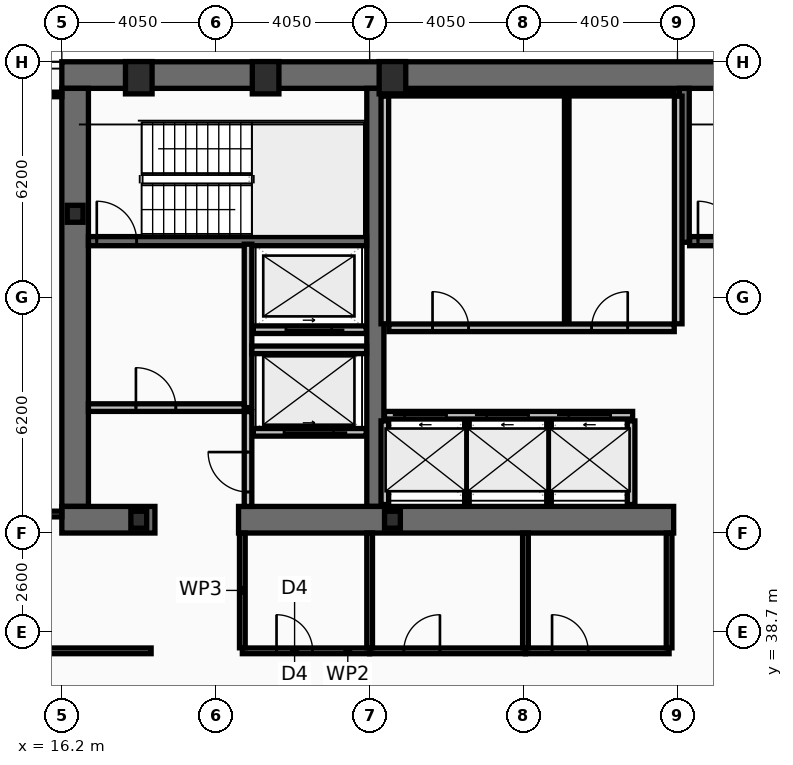
"""IFC4 building model, lengths in metres.
Left out: names, types, materials, properties, quantities, classifications, styles, units other than length and angle.
Written with IfcOpenShell. Run it as: python <this file> out.ifc"""

import sys

from ifc_helpers import new_model, si_unit, direction, frame, frame_2d, origin, origin_2d, place, context, subcontext, project, spatial, rectangle, hollow_rectangle, i_section, extrude, element, fill, save


model = new_model("IFC4")
c1 = context("Model", 3, precision=1e-05, world=origin(), true_north=direction((0.0, 1.0)))
c2 = subcontext(c1, "Body", "Model", "MODEL_VIEW")
j1 = project(units=[si_unit("LENGTHUNIT", "METRE"), si_unit("PLANEANGLEUNIT", "RADIAN")], contexts=[c1])
p1 = place(None, origin())
s1 = spatial("IfcSite", under=j1, at=p1, CompositionType="ELEMENT")
p2 = place(p1, origin())
s2 = spatial("IfcBuilding", under=s1, at=p2, CompositionType="ELEMENT")
p3 = place(p2, frame((0.0, 0.0, 129.0)))
s3 = spatial("IfcBuildingStorey", under=s2, at=p3, CompositionType="ELEMENT", Elevation=129.0)
p4 = place(p3, frame((16.2, 53.35, 0.0), z_axis=(0.0, 0.0, 1.0), x_axis=(1.0, 0.0, 0.0)))
e1 = element("IfcWall", 1, at=p4, inside=s3, PredefinedType="SHEAR", context=c2, shape_type="SweptSolid", body=[
    extrude(rectangle(XDim=40.5, YDim=0.7, at=frame_2d((20.25, 0.0))), origin(), (0.0, 0.0, 1.0), 3.44),
])
p5 = place(p3, frame((16.55, 42.0, 0.0), z_axis=(0.0, 0.0, 1.0), x_axis=(0.0, 1.0, 0.0)))
e2 = element("IfcWall", 2, at=p5, inside=s3, PredefinedType="SHEAR", context=c2, shape_type="SweptSolid", body=[
    extrude(rectangle(XDim=11.0, YDim=0.7, at=frame_2d((5.5, 0.0))), origin(), (0.0, 0.0, 1.0), 3.44),
])
p6 = place(p3, frame((24.45, 42.0, 0.0), z_axis=(0.0, 0.0, 1.0), x_axis=(0.0, 1.0, 0.0)))
e3 = element("IfcWall", 3, at=p6, inside=s3, PredefinedType="SHEAR", context=c2, shape_type="SweptSolid", body=[
    extrude(rectangle(XDim=11.0, YDim=0.45, at=frame_2d((5.5, 0.0))), origin(), (0.0, 0.0, 1.0), 3.44),
])
p7 = place(p3, frame((18.65, 41.65, 0.0), z_axis=(0.0, 0.0, 1.0), x_axis=(-1.0, 0.0, 0.0)))
e4 = element("IfcWall", 4, at=p7, inside=s3, PredefinedType="SHEAR", context=c2, shape_type="SweptSolid", body=[
    extrude(rectangle(XDim=2.45, YDim=0.7, at=frame_2d((1.225, 0.0))), origin(), (0.0, 0.0, 1.0), 3.44),
])
p8 = place(p3, frame((32.3, 41.65, 0.0), z_axis=(0.0, 0.0, 1.0), x_axis=(-1.0, 0.0, 0.0)))
e5 = element("IfcWall", 5, at=p8, inside=s3, PredefinedType="SHEAR", context=c2, shape_type="SweptSolid", body=[
    extrude(rectangle(XDim=11.45, YDim=0.7, at=frame_2d((5.725, 0.0))), origin(), (0.0, 0.0, 1.0), 3.44),
])
p9 = place(p3, frame((32.58, 48.95, 0.0), z_axis=(0.0, 0.0, 1.0), x_axis=(0.0, 1.0, 0.0)))
e6 = element("IfcWall", 6, at=p9, inside=s3, PredefinedType="SHEAR", context=c2, shape_type="SweptSolid", body=[
    extrude(rectangle(XDim=4.05, YDim=0.26, at=frame_2d((2.025, 0.0))), origin(), (0.0, 0.0, 1.0), 3.44),
])
p10 = place(p3, frame((16.9, 48.98, 0.0), z_axis=(0.0, 0.0, 1.0), x_axis=(1.0, 0.0, 0.0)))
e7 = element("IfcWall", 7, at=p10, inside=s3, PredefinedType="SHEAR", context=c2, shape_type="SweptSolid", body=[
    extrude(rectangle(XDim=7.32, YDim=0.24, at=frame_2d((3.66, 0.0))), origin(), (0.0, 0.0, 1.0), 3.44),
])
p11 = place(p10, frame((0.22, 0.0, 0.0)))
e8 = element("IfcOpeningElement", 8, at=p11, cuts=e7, PredefinedType="OPENING", context=c2, shape_type="SweptSolid", body=[
    extrude(rectangle(XDim=1.05, YDim=2.15, at=frame_2d((0.525, 1.075))), frame((0.0, 0.13, 0.0), z_axis=(0.0, -1.0, 0.0), x_axis=(1.0, 0.0, 0.0)), (0.0, 0.0, 1.0), 0.26),
])
p12 = place(p3, frame((32.72, 48.98, 0.0), z_axis=(0.0, 0.0, 1.0), x_axis=(1.0, 0.0, 0.0)))
e9 = element("IfcWall", 9, at=p12, inside=s3, PredefinedType="SHEAR", context=c2, shape_type="SweptSolid", body=[
    extrude(rectangle(XDim=7.56, YDim=0.24, at=frame_2d((3.78, 0.0))), origin(), (0.0, 0.0, 1.0), 3.44),
])
p13 = place(p12, frame((0.22, 0.0, 0.0)))
e10 = element("IfcOpeningElement", 10, at=p13, cuts=e9, PredefinedType="OPENING", context=c2, shape_type="SweptSolid", body=[
    extrude(rectangle(XDim=1.05, YDim=2.15, at=frame_2d((0.525, 1.075))), frame((0.0, 0.13, 0.0), z_axis=(0.0, -1.0, 0.0), x_axis=(1.0, 0.0, 0.0)), (0.0, 0.0, 1.0), 0.26),
])
for number, where, z_axis, x_axis in (
    (11, (18.225, 53.28, 0.0), (0.0, 0.0, 1.0), (1.0, 0.0, 0.0)),
    (12, (21.562, 53.28, 0.0), (0.0, 0.0, 1.0), (1.0, 0.0, 0.0)),
    (13, (24.9, 53.28, 0.0), (0.0, 0.0, 1.0), (1.0, 0.0, 0.0)),
):
    element("IfcColumn", number, at=place(p3, frame(where, z_axis=z_axis, x_axis=x_axis)), inside=s3, PredefinedType="COLUMN", context=c2, shape_type="SweptSolid", body=[
        extrude(hollow_rectangle(XDim=0.7, YDim=0.85, WallThickness=0.05, at=origin_2d()), origin(), (0.0, 0.0, 1.0), 3.6),
    ])
for number, where, z_axis, x_axis in (
    (14, (16.55, 49.7, 0.0), (0.0, 0.0, 1.0), (1.0, 0.0, 0.0)),
    (15, (18.225, 41.65, 0.0), (0.0, 0.0, 1.0), (1.0, 0.0, 0.0)),
    (16, (24.9, 41.65, 0.0), (0.0, 0.0, 1.0), (1.0, 0.0, 0.0)),
):
    element("IfcColumn", number, at=place(p3, frame(where, z_axis=z_axis, x_axis=x_axis)), inside=s3, PredefinedType="COLUMN", context=c2, shape_type="SweptSolid", body=[
        extrude(i_section(OverallWidth=0.416, OverallDepth=0.446, WebThickness=0.039, FlangeThickness=0.063, at=origin_2d()), origin(), (0.0, 0.0, 1.0), 3.6),
    ])
p14 = place(p3, frame((24.69, 44.4, 0.0), z_axis=(0.0, 0.0, 1.0), x_axis=(1.0, 0.0, 0.0)))
e17 = element("IfcWall", 17, at=p14, inside=s3, PredefinedType="PARTITIONING", context=c2, shape_type="SweptSolid", body=[
    extrude(rectangle(XDim=6.53, YDim=0.2, at=frame_2d((3.265, 0.0))), origin(), (0.0, 0.0, 1.0), 3.44),
])
p15 = place(p14, frame((0.53, 0.0, 0.0)))
e18 = element("IfcOpeningElement", 18, at=p15, cuts=e17, PredefinedType="OPENING", context=c2, shape_type="SweptSolid", body=[
    extrude(rectangle(XDim=1.1, YDim=2.18, at=frame_2d((0.55, 1.09))), frame((0.0, 0.11, 0.0), z_axis=(0.0, -1.0, 0.0), x_axis=(1.0, 0.0, 0.0)), (0.0, 0.0, 1.0), 0.22),
])
p16 = place(p14, frame((2.69, 0.0, 0.0)))
e19 = element("IfcOpeningElement", 19, at=p16, cuts=e17, PredefinedType="OPENING", context=c2, shape_type="SweptSolid", body=[
    extrude(rectangle(XDim=1.1, YDim=2.18, at=frame_2d((0.55, 1.09))), frame((0.0, 0.11, 0.0), z_axis=(0.0, -1.0, 0.0), x_axis=(1.0, 0.0, 0.0)), (0.0, 0.0, 1.0), 0.22),
])
p17 = place(p14, frame((4.85, 0.0, 0.0)))
e20 = element("IfcOpeningElement", 20, at=p17, cuts=e17, PredefinedType="OPENING", context=c2, shape_type="SweptSolid", body=[
    extrude(rectangle(XDim=1.1, YDim=2.18, at=frame_2d((0.55, 1.09))), frame((0.0, 0.11, 0.0), z_axis=(0.0, -1.0, 0.0), x_axis=(1.0, 0.0, 0.0)), (0.0, 0.0, 1.0), 0.22),
])
p18 = place(p3, frame((24.21, 43.95, 0.0), z_axis=(0.0, 0.0, 1.0), x_axis=(-1.0, 0.0, 0.0)))
e21 = element("IfcWall", 21, at=p18, inside=s3, PredefinedType="PARTITIONING", context=c2, shape_type="SweptSolid", body=[
    extrude(rectangle(XDim=2.97, YDim=0.2, at=frame_2d((1.485, 0.0))), origin(), (0.0, 0.0, 1.0), 3.44),
])
p19 = place(p18, frame((0.86, 0.0, 0.0)))
e22 = element("IfcOpeningElement", 22, at=p19, cuts=e21, PredefinedType="OPENING", context=c2, shape_type="SweptSolid", body=[
    extrude(rectangle(XDim=1.3, YDim=2.18, at=frame_2d((0.65, 1.09))), frame((0.0, 0.11, 0.0), z_axis=(0.0, -1.0, 0.0), x_axis=(1.0, 0.0, 0.0)), (0.0, 0.0, 1.0), 0.22),
])
p20 = place(p3, frame((24.21, 46.65, 0.0), z_axis=(0.0, 0.0, 1.0), x_axis=(-1.0, 0.0, 0.0)))
e23 = element("IfcWall", 23, at=p20, inside=s3, PredefinedType="PARTITIONING", context=c2, shape_type="SweptSolid", body=[
    extrude(rectangle(XDim=2.97, YDim=0.2, at=frame_2d((1.485, 0.0))), origin(), (0.0, 0.0, 1.0), 3.44),
])
p21 = place(p20, frame((0.91, 0.0, 0.0)))
e24 = element("IfcOpeningElement", 24, at=p21, cuts=e23, PredefinedType="OPENING", context=c2, shape_type="SweptSolid", body=[
    extrude(rectangle(XDim=1.2, YDim=2.18, at=frame_2d((0.6, 1.09))), frame((0.0, 0.11, 0.0), z_axis=(0.0, -1.0, 0.0), x_axis=(1.0, 0.0, 0.0)), (0.0, 0.0, 1.0), 0.22),
])
p22 = place(p3, frame((21.1, 44.6, 0.0), z_axis=(0.0, 0.0, 1.0), x_axis=(0.0, 1.0, 0.0)))
e25 = element("IfcWall", 25, at=p22, inside=s3, PredefinedType="PARTITIONING", context=c2, shape_type="SweptSolid", body=[
    extrude(rectangle(XDim=4.3, YDim=0.2, at=frame_2d((2.15, 0.0))), origin(), (0.0, 0.0, 1.0), 3.44),
])
p23 = place(p3, frame((16.9, 44.6, 0.0), z_axis=(0.0, 0.0, 1.0), x_axis=(1.0, 0.0, 0.0)))
e26 = element("IfcWall", 26, at=p23, inside=s3, PredefinedType="PARTITIONING", context=c2, shape_type="SweptSolid", body=[
    extrude(rectangle(XDim=4.1, YDim=0.2, at=frame_2d((2.05, 0.0))), origin(), (0.0, 0.0, 1.0), 3.44),
])
p24 = place(p23, frame((1.25, 0.0, 0.0)))
e27 = element("IfcOpeningElement", 27, at=p24, cuts=e26, PredefinedType="OPENING", context=c2, shape_type="SweptSolid", body=[
    extrude(rectangle(XDim=1.05, YDim=2.15, at=frame_2d((0.525, 1.075))), frame((0.0, 0.11, 0.0), z_axis=(0.0, -1.0, 0.0), x_axis=(1.0, 0.0, 0.0)), (0.0, 0.0, 1.0), 0.22),
])
p25 = place(p3, frame((21.2, 46.12, 0.0), z_axis=(0.0, 0.0, 1.0), x_axis=(1.0, 0.0, 0.0)))
e28 = element("IfcWall", 28, at=p25, inside=s3, PredefinedType="PARTITIONING", context=c2, shape_type="SweptSolid", body=[
    extrude(rectangle(XDim=3.02, YDim=0.2, at=frame_2d((1.51, 0.0))), origin(), (0.0, 0.0, 1.0), 3.44),
])
p26 = place(p3, frame((21.1, 42.0, 0.0), z_axis=(0.0, 0.0, 1.0), x_axis=(0.0, 1.0, 0.0)))
e29 = element("IfcWall", 29, at=p26, inside=s3, PredefinedType="PARTITIONING", context=c2, shape_type="SweptSolid", body=[
    extrude(rectangle(XDim=2.495, YDim=0.2, at=frame_2d((1.248, 0.0))), origin(), (0.0, 0.0, 1.0), 3.44),
])
p27 = place(p26, frame((0.38, 0.0, 0.0)))
e30 = element("IfcOpeningElement", 30, at=p27, cuts=e29, PredefinedType="OPENING", context=c2, shape_type="SweptSolid", body=[
    extrude(rectangle(XDim=1.05, YDim=2.15, at=frame_2d((0.525, 1.075))), frame((0.0, 0.11, 0.0), z_axis=(0.0, -1.0, 0.0), x_axis=(1.0, 0.0, 0.0)), (0.0, 0.0, 1.0), 0.22),
])
for number, where, z_axis, x_axis in (
    (31, (24.7, 46.805, 0.0), (0.0, 0.0, 1.0), (0.0, 1.0, 0.0)),
    (32, (32.42, 46.805, 0.0), (0.0, 0.0, 1.0), (0.0, 1.0, 0.0)),
):
    element("IfcWall", number, at=place(p3, frame(where, z_axis=z_axis, x_axis=x_axis)), inside=s3, PredefinedType="PARTITIONING", context=c2, shape_type="SweptSolid", body=[
        extrude(rectangle(XDim=5.99, YDim=0.2, at=frame_2d((2.995, 0.0))), origin(), (0.0, 0.0, 1.0), 3.44),
    ])
p28 = place(p3, frame((24.805, 52.86, 0.0), z_axis=(0.0, 0.0, 1.0), x_axis=(1.0, 0.0, 0.0)))
e33 = element("IfcWall", 33, at=p28, inside=s3, PredefinedType="PARTITIONING", context=c2, shape_type="SweptSolid", body=[
    extrude(rectangle(XDim=7.51, YDim=0.12, at=frame_2d((3.755, 0.0))), origin(), (0.0, 0.0, 1.0), 3.44),
])
p29 = place(p3, frame((29.486, 46.805, 0.0), z_axis=(0.0, 0.0, 1.0), x_axis=(0.0, 1.0, 0.0)))
e34 = element("IfcWall", 34, at=p29, inside=s3, PredefinedType="PARTITIONING", context=c2, shape_type="SweptSolid", body=[
    extrude(rectangle(XDim=5.99, YDim=0.12, at=frame_2d((2.995, 0.0))), origin(), (0.0, 0.0, 1.0), 3.44),
])
p30 = place(p3, frame((24.805, 46.7, 0.0), z_axis=(0.0, 0.0, 1.0), x_axis=(1.0, 0.0, 0.0)))
e35 = element("IfcWall", 35, at=p30, inside=s3, PredefinedType="PARTITIONING", context=c2, shape_type="SweptSolid", body=[
    extrude(rectangle(XDim=7.51, YDim=0.2, at=frame_2d((3.755, 0.0))), origin(), (0.0, 0.0, 1.0), 3.44),
])
p31 = place(p30, frame((1.15, 0.0, 0.0)))
e36 = element("IfcOpeningElement", 36, at=p31, cuts=e35, PredefinedType="OPENING", context=c2, shape_type="SweptSolid", body=[
    extrude(rectangle(XDim=0.95, YDim=2.1, at=frame_2d((0.475, 1.05))), frame((0.0, 0.11, 0.0), z_axis=(0.0, -1.0, 0.0), x_axis=(1.0, 0.0, 0.0)), (0.0, 0.0, 1.0), 0.22),
])
p32 = place(p30, frame((5.336, 0.0, 0.0)))
e37 = element("IfcOpeningElement", 37, at=p32, cuts=e35, PredefinedType="OPENING", context=c2, shape_type="SweptSolid", body=[
    extrude(rectangle(XDim=0.95, YDim=2.1, at=frame_2d((0.475, 1.05))), frame((0.0, 0.11, 0.0), z_axis=(0.0, -1.0, 0.0), x_axis=(1.0, 0.0, 0.0)), (0.0, 0.0, 1.0), 0.22),
])
for number, where, z_axis, x_axis in (
    (38, (24.7, 42.05, 0.0), (0.0, 0.0, 1.0), (0.0, 1.0, 0.0)),
    (39, (31.18, 42.05, 0.0), (0.0, 0.0, 1.0), (0.0, 1.0, 0.0)),
):
    element("IfcWall", number, at=place(p3, frame(where, z_axis=z_axis, x_axis=x_axis)), inside=s3, PredefinedType="PARTITIONING", context=c2, shape_type="SweptSolid", body=[
        extrude(rectangle(XDim=2.2, YDim=0.2, at=frame_2d((1.1, 0.0))), origin(), (0.0, 0.0, 1.0), 3.44),
    ])
for number, where, z_axis, x_axis in (
    (40, (26.86, 42.05, 0.0), (0.0, 0.0, 1.0), (0.0, 1.0, 0.0)),
    (41, (29.02, 42.05, 0.0), (0.0, 0.0, 1.0), (0.0, 1.0, 0.0)),
):
    element("IfcWall", number, at=place(p3, frame(where, z_axis=z_axis, x_axis=x_axis)), inside=s3, PredefinedType="PARTITIONING", context=c2, shape_type="SweptSolid", body=[
        extrude(rectangle(XDim=2.2, YDim=0.12, at=frame_2d((1.1, 0.0))), origin(), (0.0, 0.0, 1.0), 3.44),
    ])
p33 = place(p3, frame((20.95, 38.2, 0.0), z_axis=(0.0, 0.0, 1.0), x_axis=(1.0, 0.0, 0.0)))
e42 = element("IfcWall", 42, at=p33, inside=s3, PredefinedType="PARTITIONING", context=c2, shape_type="SweptSolid", body=[
    extrude(rectangle(XDim=3.35, YDim=0.15, at=frame_2d((1.675, 0.0))), origin(), (0.0, 0.0, 1.0), 3.44),
])
p34 = place(p33, frame((0.9, 0.0, 0.0)))
e43 = element("IfcOpeningElement", 43, at=p34, cuts=e42, PredefinedType="OPENING", context=c2, shape_type="SweptSolid", body=[
    extrude(rectangle(XDim=0.95, YDim=2.05, at=frame_2d((0.475, 1.025))), frame((0.0, 0.085, 0.0), z_axis=(0.0, -1.0, 0.0), x_axis=(1.0, 0.0, 0.0)), (0.0, 0.0, 1.0), 0.17),
])
p35 = place(p3, frame((24.3, 38.2, 0.0), z_axis=(0.0, 0.0, 1.0), x_axis=(1.0, 0.0, 0.0)))
e44 = element("IfcWall", 44, at=p35, inside=s3, PredefinedType="PARTITIONING", context=c2, shape_type="SweptSolid", body=[
    extrude(rectangle(XDim=4.1, YDim=0.15, at=frame_2d((2.05, 0.0))), origin(), (0.0, 0.0, 1.0), 2.73),
])
p36 = place(p35, frame((0.9, 0.0, 0.0)))
e45 = element("IfcOpeningElement", 45, at=p36, cuts=e44, PredefinedType="OPENING", context=c2, shape_type="SweptSolid", body=[
    extrude(rectangle(XDim=0.95, YDim=2.05, at=frame_2d((0.475, 1.025))), frame((0.0, 0.085, 0.0), z_axis=(0.0, -1.0, 0.0), x_axis=(1.0, 0.0, 0.0)), (0.0, 0.0, 1.0), 0.17),
])
p37 = place(p3, frame((28.4, 38.2, 0.0), z_axis=(0.0, 0.0, 1.0), x_axis=(1.0, 0.0, 0.0)))
e46 = element("IfcWall", 46, at=p37, inside=s3, PredefinedType="PARTITIONING", context=c2, shape_type="SweptSolid", body=[
    extrude(rectangle(XDim=3.78, YDim=0.15, at=frame_2d((1.89, 0.0))), origin(), (0.0, 0.0, 1.0), 2.73),
])
p38 = place(p37, frame((0.7, 0.0, 0.0)))
e47 = element("IfcOpeningElement", 47, at=p38, cuts=e46, PredefinedType="OPENING", context=c2, shape_type="SweptSolid", body=[
    extrude(rectangle(XDim=0.95, YDim=2.05, at=frame_2d((0.475, 1.025))), frame((0.0, 0.085, 0.0), z_axis=(0.0, -1.0, 0.0), x_axis=(1.0, 0.0, 0.0)), (0.0, 0.0, 1.0), 0.17),
])
for number, where, z_axis, x_axis in (
    (48, (20.95, 38.28, 0.0), (0.0, 0.0, 1.0), (0.0, 1.0, 0.0)),
    (49, (24.3, 38.28, 0.0), (0.0, 0.0, 1.0), (0.0, 1.0, 0.0)),
    (50, (28.4, 38.28, 0.0), (0.0, 0.0, 1.0), (0.0, 1.0, 0.0)),
    (51, (32.18, 38.28, 0.0), (0.0, 0.0, 1.0), (0.0, 1.0, 0.0)),
):
    element("IfcWall", number, at=place(p3, frame(where, z_axis=z_axis, x_axis=x_axis)), inside=s3, PredefinedType="PARTITIONING", context=c2, shape_type="SweptSolid", body=[
        extrude(rectangle(XDim=3.02, YDim=0.15, at=frame_2d((1.51, 0.0))), origin(), (0.0, 0.0, 1.0), 3.44),
    ])
p39 = place(p3, frame((4.03, 38.2, 0.0), z_axis=(0.0, 0.0, 1.0), x_axis=(1.0, 0.0, 0.0)))
e52 = element("IfcWall", 52, at=p39, inside=s3, PredefinedType="PARTITIONING", context=c2, shape_type="SweptSolid", body=[
    extrude(rectangle(XDim=14.52, YDim=0.15, at=frame_2d((7.26, 0.0))), origin(), (0.0, 0.0, 1.0), 2.73),
])
p40 = place(p39, frame((10.32, 0.0, 0.0)))
e53 = element("IfcOpeningElement", 53, at=p40, cuts=e52, PredefinedType="OPENING", context=c2, shape_type="SweptSolid", body=[
    extrude(rectangle(XDim=0.95, YDim=2.05, at=frame_2d((0.475, 1.025))), frame((0.0, 0.085, 0.0), z_axis=(0.0, -1.0, 0.0), x_axis=(1.0, 0.0, 0.0)), (0.0, 0.0, 1.0), 0.17),
])
p41 = place(p3, frame((4.095, 41.8, 0.0), z_axis=(0.0, 0.0, 1.0), x_axis=(1.0, 0.0, 0.0)))
e54 = element("IfcWall", 54, at=p41, inside=s3, PredefinedType="PARTITIONING", context=c2, shape_type="SweptSolid", body=[
    extrude(rectangle(XDim=12.105, YDim=0.15, at=frame_2d((6.052, 0.0))), origin(), (0.0, 0.0, 1.0), 3.44),
])
p42 = place(p41, frame((10.32, 0.0, 0.0)))
e55 = element("IfcOpeningElement", 55, at=p42, cuts=e54, PredefinedType="OPENING", context=c2, shape_type="SweptSolid", body=[
    extrude(rectangle(XDim=0.9, YDim=2.05, at=frame_2d((0.45, 1.025))), frame((0.0, 0.085, 0.0), z_axis=(0.0, -1.0, 0.0), x_axis=(1.0, 0.0, 0.0)), (0.0, 0.0, 1.0), 0.17),
])
p43 = place(p3, frame((4.095, 52.84, 0.0), z_axis=(0.0, 0.0, 1.0), x_axis=(1.0, 0.0, 0.0)))
e56 = element("IfcWall", 56, at=p43, inside=s3, PredefinedType="PARTITIONING", context=c2, shape_type="SweptSolid", body=[
    extrude(rectangle(XDim=12.105, YDim=0.12, at=frame_2d((6.052, 0.0))), origin(), (0.0, 0.0, 1.0), 3.44),
])
p44 = place(p11, origin())
e57 = element("IfcDoor", 57, at=p44, inside=s3, OperationType="SINGLE_SWING_LEFT", PredefinedType="DOOR", context=c2, shape_type="SweptSolid", body=[
    extrude(rectangle(XDim=1.05, YDim=2.15, at=frame_2d((0.525, 1.075))), frame((0.0, 0.025, 0.0), z_axis=(0.0, -1.0, 0.0), x_axis=(1.0, 0.0, 0.0)), (0.0, 0.0, 1.0), 0.05),
])
fill(e8, e57)
p45 = place(p13, origin())
e58 = element("IfcDoor", 58, at=p45, inside=s3, OperationType="SINGLE_SWING_LEFT", PredefinedType="DOOR", context=c2, shape_type="SweptSolid", body=[
    extrude(rectangle(XDim=1.05, YDim=2.15, at=frame_2d((0.525, 1.075))), frame((0.0, 0.025, 0.0), z_axis=(0.0, -1.0, 0.0), x_axis=(1.0, 0.0, 0.0)), (0.0, 0.0, 1.0), 0.05),
])
fill(e10, e58)
p46 = place(p15, origin())
e59 = element("IfcDoor", 59, at=p46, inside=s3, OperationType="SLIDING_TO_LEFT", PredefinedType="DOOR", context=c2, shape_type="SweptSolid", body=[
    extrude(rectangle(XDim=1.1, YDim=2.18, at=frame_2d((0.55, 1.09))), frame((0.0, 0.025, 0.0), z_axis=(0.0, -1.0, 0.0), x_axis=(1.0, 0.0, 0.0)), (0.0, 0.0, 1.0), 0.05),
])
fill(e18, e59)
p47 = place(p16, origin())
e60 = element("IfcDoor", 60, at=p47, inside=s3, OperationType="SLIDING_TO_LEFT", PredefinedType="DOOR", context=c2, shape_type="SweptSolid", body=[
    extrude(rectangle(XDim=1.1, YDim=2.18, at=frame_2d((0.55, 1.09))), frame((0.0, 0.025, 0.0), z_axis=(0.0, -1.0, 0.0), x_axis=(1.0, 0.0, 0.0)), (0.0, 0.0, 1.0), 0.05),
])
fill(e19, e60)
p48 = place(p17, origin())
e61 = element("IfcDoor", 61, at=p48, inside=s3, OperationType="SLIDING_TO_LEFT", PredefinedType="DOOR", context=c2, shape_type="SweptSolid", body=[
    extrude(rectangle(XDim=1.1, YDim=2.18, at=frame_2d((0.55, 1.09))), frame((0.0, 0.025, 0.0), z_axis=(0.0, -1.0, 0.0), x_axis=(1.0, 0.0, 0.0)), (0.0, 0.0, 1.0), 0.05),
])
fill(e20, e61)
p49 = place(p19, origin())
e62 = element("IfcDoor", 62, at=p49, inside=s3, OperationType="SLIDING_TO_LEFT", PredefinedType="DOOR", context=c2, shape_type="SweptSolid", body=[
    extrude(rectangle(XDim=1.3, YDim=2.18, at=frame_2d((0.65, 1.09))), frame((0.0, 0.025, 0.0), z_axis=(0.0, -1.0, 0.0), x_axis=(1.0, 0.0, 0.0)), (0.0, 0.0, 1.0), 0.05),
])
fill(e22, e62)
p50 = place(p21, origin())
e63 = element("IfcDoor", 63, at=p50, inside=s3, OperationType="SLIDING_TO_LEFT", PredefinedType="DOOR", context=c2, shape_type="SweptSolid", body=[
    extrude(rectangle(XDim=1.2, YDim=2.18, at=frame_2d((0.6, 1.09))), frame((0.0, 0.025, 0.0), z_axis=(0.0, -1.0, 0.0), x_axis=(1.0, 0.0, 0.0)), (0.0, 0.0, 1.0), 0.05),
])
fill(e24, e63)
p51 = place(p24, origin())
e64 = element("IfcDoor", 64, at=p51, inside=s3, OperationType="SINGLE_SWING_LEFT", PredefinedType="DOOR", context=c2, shape_type="SweptSolid", body=[
    extrude(rectangle(XDim=1.05, YDim=2.15, at=frame_2d((0.525, 1.075))), frame((0.0, 0.025, 0.0), z_axis=(0.0, -1.0, 0.0), x_axis=(1.0, 0.0, 0.0)), (0.0, 0.0, 1.0), 0.05),
])
fill(e27, e64)
p52 = place(p27, origin())
e65 = element("IfcDoor", 65, at=p52, inside=s3, OperationType="SINGLE_SWING_RIGHT", PredefinedType="DOOR", context=c2, shape_type="SweptSolid", body=[
    extrude(rectangle(XDim=1.05, YDim=2.15, at=frame_2d((0.525, 1.075))), frame((0.0, 0.025, 0.0), z_axis=(0.0, -1.0, 0.0), x_axis=(1.0, 0.0, 0.0)), (0.0, 0.0, 1.0), 0.05),
])
fill(e30, e65)
p53 = place(p31, origin())
e66 = element("IfcDoor", 66, at=p53, inside=s3, OperationType="SINGLE_SWING_LEFT", PredefinedType="DOOR", context=c2, shape_type="SweptSolid", body=[
    extrude(rectangle(XDim=0.95, YDim=2.1, at=frame_2d((0.475, 1.05))), frame((0.0, 0.025, 0.0), z_axis=(0.0, -1.0, 0.0), x_axis=(1.0, 0.0, 0.0)), (0.0, 0.0, 1.0), 0.05),
])
fill(e36, e66)
p54 = place(p32, origin())
e67 = element("IfcDoor", 67, at=p54, inside=s3, OperationType="SINGLE_SWING_RIGHT", PredefinedType="DOOR", context=c2, shape_type="SweptSolid", body=[
    extrude(rectangle(XDim=0.95, YDim=2.1, at=frame_2d((0.475, 1.05))), frame((0.0, 0.025, 0.0), z_axis=(0.0, -1.0, 0.0), x_axis=(1.0, 0.0, 0.0)), (0.0, 0.0, 1.0), 0.05),
])
fill(e37, e67)
p55 = place(p34, origin())
e68 = element("IfcDoor", 68, at=p55, inside=s3, OperationType="SINGLE_SWING_LEFT", PredefinedType="DOOR", context=c2, shape_type="SweptSolid", body=[
    extrude(rectangle(XDim=0.95, YDim=2.05, at=frame_2d((0.475, 1.025))), frame((0.0, 0.025, 0.0), z_axis=(0.0, -1.0, 0.0), x_axis=(1.0, 0.0, 0.0)), (0.0, 0.0, 1.0), 0.05),
])
fill(e43, e68)
p56 = place(p36, origin())
e69 = element("IfcDoor", 69, at=p56, inside=s3, OperationType="SINGLE_SWING_RIGHT", PredefinedType="DOOR", context=c2, shape_type="SweptSolid", body=[
    extrude(rectangle(XDim=0.95, YDim=2.05, at=frame_2d((0.475, 1.025))), frame((0.0, 0.025, 0.0), z_axis=(0.0, -1.0, 0.0), x_axis=(1.0, 0.0, 0.0)), (0.0, 0.0, 1.0), 0.05),
])
fill(e45, e69)
p57 = place(p38, origin())
e70 = element("IfcDoor", 70, at=p57, inside=s3, OperationType="SINGLE_SWING_LEFT", PredefinedType="DOOR", context=c2, shape_type="SweptSolid", body=[
    extrude(rectangle(XDim=0.95, YDim=2.05, at=frame_2d((0.475, 1.025))), frame((0.0, 0.025, 0.0), z_axis=(0.0, -1.0, 0.0), x_axis=(1.0, 0.0, 0.0)), (0.0, 0.0, 1.0), 0.05),
])
fill(e47, e70)
save(model, sys.argv[1])
